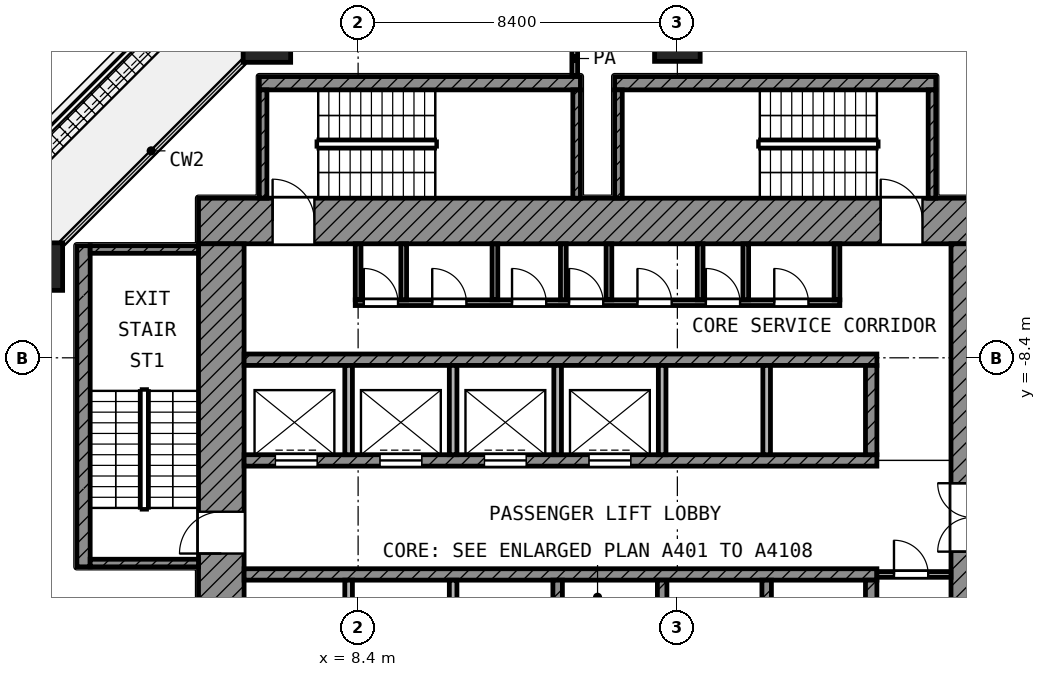
"""IFC4 building model, lengths in metres.
Left out: names, types, materials, properties, quantities, classifications, styles, units other than length and angle.
Written with IfcOpenShell. Run it as: python <this file> out.ifc"""

import sys

from ifc_helpers import new_model, si_unit, direction, frame, frame_2d, origin, origin_2d, place, context, subcontext, project, spatial, rectangle, extrude, element, fill, save


model = new_model("IFC4")
c1 = context("Model", 3, precision=1e-05, world=origin(), true_north=direction((0.0, 1.0)))
c2 = subcontext(c1, "Body", "Model", "MODEL_VIEW")
j1 = project(units=[si_unit("LENGTHUNIT", "METRE"), si_unit("PLANEANGLEUNIT", "RADIAN")], contexts=[c1])
p1 = place(None, origin())
s1 = spatial("IfcSite", under=j1, at=p1, CompositionType="ELEMENT")
p2 = place(p1, origin())
s2 = spatial("IfcBuilding", under=s1, at=p2, CompositionType="ELEMENT")
p3 = place(p2, frame((0.0, 0.0, 47.6)))
s3 = spatial("IfcBuildingStorey", under=s2, at=p3, CompositionType="ELEMENT", Elevation=47.6)
p4 = place(p3, frame((6.0, 0.0, 0.0), z_axis=(0.0, 0.0, 1.0), x_axis=(1.0, 0.0, 0.0)))
e1 = element("IfcColumn", 1, at=p4, inside=s3, PredefinedType="COLUMN", context=c2, shape_type="SweptSolid", body=[
    extrude(rectangle(XDim=1.25, YDim=1.25, at=origin_2d()), origin(), (0.0, 0.0, 1.0), 4.2),
])
p5 = place(p3, frame((16.8, 0.0, 0.0), z_axis=(0.0, 0.0, 1.0), x_axis=(1.0, 0.0, 0.0)))
e2 = element("IfcColumn", 2, at=p5, inside=s3, PredefinedType="COLUMN", context=c2, shape_type="SweptSolid", body=[
    extrude(rectangle(XDim=1.2, YDim=1.2, at=origin_2d()), origin(), (0.0, 0.0, 1.0), 4.2),
])
p6 = place(p3, frame((0.0, -6.0, 0.0), z_axis=(0.0, 0.0, 1.0), x_axis=(1.0, 0.0, 0.0)))
e3 = element("IfcColumn", 3, at=p6, inside=s3, PredefinedType="COLUMN", context=c2, shape_type="SweptSolid", body=[
    extrude(rectangle(XDim=1.25, YDim=1.25, at=origin_2d()), origin(), (0.0, 0.0, 1.0), 4.2),
])
p7 = place(p3, frame((4.2, -4.8, 0.0), z_axis=(0.0, 0.0, 1.0), x_axis=(1.0, 0.0, 0.0)))
e4 = element("IfcWall", 4, at=p7, inside=s3, PredefinedType="SHEAR", context=c2, shape_type="SweptSolid", body=[
    extrude(rectangle(XDim=20.9, YDim=1.2, at=frame_2d((10.45, 0.0))), origin(), (0.0, 0.0, 1.0), 3.78),
])
p8 = place(p7, frame((1.95, 0.0, 0.0)))
e5 = element("IfcOpeningElement", 5, at=p8, cuts=e4, PredefinedType="OPENING", context=c2, shape_type="SweptSolid", body=[
    extrude(rectangle(XDim=1.1, YDim=2.1, at=frame_2d((0.55, 1.05))), frame((0.0, 0.61, 0.0), z_axis=(0.0, -1.0, 0.0), x_axis=(1.0, 0.0, 0.0)), (0.0, 0.0, 1.0), 1.22),
])
p9 = place(p7, frame((17.95, 0.0, 0.0)))
e6 = element("IfcOpeningElement", 6, at=p9, cuts=e4, PredefinedType="OPENING", context=c2, shape_type="SweptSolid", body=[
    extrude(rectangle(XDim=1.1, YDim=2.1, at=frame_2d((0.55, 1.05))), frame((0.0, 0.61, 0.0), z_axis=(0.0, -1.0, 0.0), x_axis=(1.0, 0.0, 0.0)), (0.0, 0.0, 1.0), 1.22),
])
p10 = place(p3, frame((4.8, -25.1, 0.0), z_axis=(0.0, 0.0, 1.0), x_axis=(0.0, 1.0, 0.0)))
e7 = element("IfcWall", 7, at=p10, inside=s3, PredefinedType="SHEAR", context=c2, shape_type="SweptSolid", body=[
    extrude(rectangle(XDim=19.7, YDim=1.2, at=frame_2d((9.85, 0.0))), origin(), (0.0, 0.0, 1.0), 3.78),
])
p11 = place(p10, frame((11.55, 0.0, 0.0)))
e8 = element("IfcOpeningElement", 8, at=p11, cuts=e7, PredefinedType="OPENING", context=c2, shape_type="SweptSolid", body=[
    extrude(rectangle(XDim=1.1, YDim=2.1, at=frame_2d((0.55, 1.05))), frame((0.0, 0.61, 0.0), z_axis=(0.0, -1.0, 0.0), x_axis=(1.0, 0.0, 0.0)), (0.0, 0.0, 1.0), 1.22),
])
p12 = place(p10, frame((2.25, 0.0, 0.0)))
e9 = element("IfcOpeningElement", 9, at=p12, cuts=e7, PredefinedType="OPENING", context=c2, shape_type="SweptSolid", body=[
    extrude(rectangle(XDim=1.1, YDim=2.1, at=frame_2d((0.55, 1.05))), frame((0.0, 0.61, 0.0), z_axis=(0.0, -1.0, 0.0), x_axis=(1.0, 0.0, 0.0)), (0.0, 0.0, 1.0), 1.22),
])
p13 = place(p3, frame((24.55, -24.0, 0.0), z_axis=(0.0, 0.0, 1.0), x_axis=(0.0, 1.0, 0.0)))
e10 = element("IfcWall", 10, at=p13, inside=s3, PredefinedType="SHEAR", context=c2, shape_type="SweptSolid", body=[
    extrude(rectangle(XDim=18.6, YDim=1.1, at=frame_2d((9.3, 0.0))), origin(), (0.0, 0.0, 1.0), 3.78),
])
p14 = place(p13, frame((10.5, 0.0, 0.0)))
e11 = element("IfcOpeningElement", 11, at=p14, cuts=e10, PredefinedType="OPENING", context=c2, shape_type="SweptSolid", body=[
    extrude(rectangle(XDim=1.8, YDim=2.1, at=frame_2d((0.9, 1.05))), frame((0.0, 0.56, 0.0), z_axis=(0.0, -1.0, 0.0), x_axis=(1.0, 0.0, 0.0)), (0.0, 0.0, 1.0), 1.12),
])
p15 = place(p3, frame((5.4, -8.45, 0.0), z_axis=(0.0, 0.0, 1.0), x_axis=(1.0, 0.0, 0.0)))
e12 = element("IfcWall", 12, at=p15, inside=s3, PredefinedType="SHEAR", context=c2, shape_type="SweptSolid", body=[
    extrude(rectangle(XDim=16.65, YDim=0.3, at=frame_2d((8.325, 0.0))), origin(), (0.0, 0.0, 1.0), 3.78),
])
p16 = place(p3, frame((5.4, -11.1, 0.0), z_axis=(0.0, 0.0, 1.0), x_axis=(1.0, 0.0, 0.0)))
e13 = element("IfcWall", 13, at=p16, inside=s3, PredefinedType="SHEAR", context=c2, shape_type="SweptSolid", body=[
    extrude(rectangle(XDim=16.65, YDim=0.3, at=frame_2d((8.325, 0.0))), origin(), (0.0, 0.0, 1.0), 3.78),
])
p17 = place(p16, frame((0.825, 0.0, 0.0)))
e14 = element("IfcOpeningElement", 14, at=p17, cuts=e13, PredefinedType="OPENING", context=c2, shape_type="SweptSolid", body=[
    extrude(rectangle(XDim=1.1, YDim=2.1, at=frame_2d((0.55, 1.05))), frame((0.0, 0.16, 0.0), z_axis=(0.0, -1.0, 0.0), x_axis=(1.0, 0.0, 0.0)), (0.0, 0.0, 1.0), 0.32),
])
p18 = place(p16, frame((3.575, 0.0, 0.0)))
e15 = element("IfcOpeningElement", 15, at=p18, cuts=e13, PredefinedType="OPENING", context=c2, shape_type="SweptSolid", body=[
    extrude(rectangle(XDim=1.1, YDim=2.1, at=frame_2d((0.55, 1.05))), frame((0.0, 0.16, 0.0), z_axis=(0.0, -1.0, 0.0), x_axis=(1.0, 0.0, 0.0)), (0.0, 0.0, 1.0), 0.32),
])
p19 = place(p16, frame((6.325, 0.0, 0.0)))
e16 = element("IfcOpeningElement", 16, at=p19, cuts=e13, PredefinedType="OPENING", context=c2, shape_type="SweptSolid", body=[
    extrude(rectangle(XDim=1.1, YDim=2.1, at=frame_2d((0.55, 1.05))), frame((0.0, 0.16, 0.0), z_axis=(0.0, -1.0, 0.0), x_axis=(1.0, 0.0, 0.0)), (0.0, 0.0, 1.0), 0.32),
])
p20 = place(p16, frame((9.075, 0.0, 0.0)))
e17 = element("IfcOpeningElement", 17, at=p20, cuts=e13, PredefinedType="OPENING", context=c2, shape_type="SweptSolid", body=[
    extrude(rectangle(XDim=1.1, YDim=2.1, at=frame_2d((0.55, 1.05))), frame((0.0, 0.16, 0.0), z_axis=(0.0, -1.0, 0.0), x_axis=(1.0, 0.0, 0.0)), (0.0, 0.0, 1.0), 0.32),
])
p21 = place(p3, frame((5.4, -14.1, 0.0), z_axis=(0.0, 0.0, 1.0), x_axis=(1.0, 0.0, 0.0)))
e18 = element("IfcWall", 18, at=p21, inside=s3, PredefinedType="SHEAR", context=c2, shape_type="SweptSolid", body=[
    extrude(rectangle(XDim=16.65, YDim=0.3, at=frame_2d((8.325, 0.0))), origin(), (0.0, 0.0, 1.0), 3.78),
])
p22 = place(p3, frame((21.9, -10.95, 0.0), z_axis=(0.0, 0.0, 1.0), x_axis=(0.0, 1.0, 0.0)))
e19 = element("IfcWall", 19, at=p22, inside=s3, PredefinedType="SHEAR", context=c2, shape_type="SweptSolid", body=[
    extrude(rectangle(XDim=2.35, YDim=0.3, at=frame_2d((1.175, 0.0))), origin(), (0.0, 0.0, 1.0), 3.78),
])
p23 = place(p3, frame((21.9, -16.6, 0.0), z_axis=(0.0, 0.0, 1.0), x_axis=(0.0, 1.0, 0.0)))
e20 = element("IfcWall", 20, at=p23, inside=s3, PredefinedType="SHEAR", context=c2, shape_type="SweptSolid", body=[
    extrude(rectangle(XDim=2.35, YDim=0.3, at=frame_2d((1.175, 0.0))), origin(), (0.0, 0.0, 1.0), 3.78),
])
for number, where, z_axis, x_axis in (
    (21, (8.15, -10.95, 0.0), (0.0, 0.0, 1.0), (0.0, 1.0, 0.0)),
    (22, (10.9, -10.95, 0.0), (0.0, 0.0, 1.0), (0.0, 1.0, 0.0)),
    (23, (13.65, -10.95, 0.0), (0.0, 0.0, 1.0), (0.0, 1.0, 0.0)),
    (24, (16.4, -10.95, 0.0), (0.0, 0.0, 1.0), (0.0, 1.0, 0.0)),
    (25, (19.15, -10.95, 0.0), (0.0, 0.0, 1.0), (0.0, 1.0, 0.0)),
):
    element("IfcWall", number, at=place(p3, frame(where, z_axis=z_axis, x_axis=x_axis)), inside=s3, PredefinedType="PARTITIONING", context=c2, shape_type="SweptSolid", body=[
        extrude(rectangle(XDim=2.35, YDim=0.2, at=frame_2d((1.175, 0.0))), origin(), (0.0, 0.0, 1.0), 3.78),
    ])
for number, where, z_axis, x_axis in (
    (26, (8.15, -16.6, 0.0), (0.0, 0.0, 1.0), (0.0, 1.0, 0.0)),
    (27, (10.9, -16.6, 0.0), (0.0, 0.0, 1.0), (0.0, 1.0, 0.0)),
):
    element("IfcWall", number, at=place(p3, frame(where, z_axis=z_axis, x_axis=x_axis)), inside=s3, PredefinedType="PARTITIONING", context=c2, shape_type="SweptSolid", body=[
        extrude(rectangle(XDim=2.35, YDim=0.2, at=frame_2d((1.175, 0.0))), origin(), (0.0, 0.0, 1.0), 3.78),
    ])
for number, where, z_axis, x_axis in (
    (28, (13.65, -16.6, 0.0), (0.0, 0.0, 1.0), (0.0, 1.0, 0.0)),
    (29, (16.4, -16.6, 0.0), (0.0, 0.0, 1.0), (0.0, 1.0, 0.0)),
    (30, (19.15, -16.6, 0.0), (0.0, 0.0, 1.0), (0.0, 1.0, 0.0)),
):
    element("IfcWall", number, at=place(p3, frame(where, z_axis=z_axis, x_axis=x_axis)), inside=s3, PredefinedType="SHEAR", context=c2, shape_type="SweptSolid", body=[
        extrude(rectangle(XDim=2.35, YDim=0.25, at=frame_2d((1.175, 0.0))), origin(), (0.0, 0.0, 1.0), 3.78),
    ])
p24 = place(p3, frame((22.05, -14.1, 0.0), z_axis=(0.0, 0.0, 1.0), x_axis=(1.0, 0.0, 0.0)))
e31 = element("IfcWall", 31, at=p24, inside=s3, PredefinedType="PARTITIONING", context=c2, shape_type="SweptSolid", body=[
    extrude(rectangle(XDim=1.95, YDim=0.15, at=frame_2d((0.975, 0.0))), origin(), (0.0, 0.0, 1.0), 3.78),
])
p25 = place(p24, frame((0.45, 0.0, 0.0)))
e32 = element("IfcOpeningElement", 32, at=p25, cuts=e31, PredefinedType="OPENING", context=c2, shape_type="SweptSolid", body=[
    extrude(rectangle(XDim=0.9, YDim=2.1, at=frame_2d((0.45, 1.05))), frame((0.0, 0.085, 0.0), z_axis=(0.0, -1.0, 0.0), x_axis=(1.0, 0.0, 0.0)), (0.0, 0.0, 1.0), 0.17),
])
p26 = place(p3, frame((8.325, -6.95, 0.0), z_axis=(0.0, 0.0, 1.0), x_axis=(1.0, 0.0, 0.0)))
e33 = element("IfcWall", 33, at=p26, inside=s3, PredefinedType="PARTITIONING", context=c2, shape_type="SweptSolid", body=[
    extrude(rectangle(XDim=12.75, YDim=0.15, at=frame_2d((6.375, 0.0))), origin(), (0.0, 0.0, 1.0), 3.78),
])
p27 = place(p26, frame((0.225, 0.0, 0.0)))
e34 = element("IfcOpeningElement", 34, at=p27, cuts=e33, PredefinedType="OPENING", context=c2, shape_type="SweptSolid", body=[
    extrude(rectangle(XDim=0.9, YDim=2.1, at=frame_2d((0.45, 1.05))), frame((0.0, 0.085, 0.0), z_axis=(0.0, -1.0, 0.0), x_axis=(1.0, 0.0, 0.0)), (0.0, 0.0, 1.0), 0.17),
])
p28 = place(p26, frame((2.025, 0.0, 0.0)))
e35 = element("IfcOpeningElement", 35, at=p28, cuts=e33, PredefinedType="OPENING", context=c2, shape_type="SweptSolid", body=[
    extrude(rectangle(XDim=0.9, YDim=2.1, at=frame_2d((0.45, 1.05))), frame((0.0, 0.085, 0.0), z_axis=(0.0, -1.0, 0.0), x_axis=(1.0, 0.0, 0.0)), (0.0, 0.0, 1.0), 0.17),
])
p29 = place(p26, frame((4.125, 0.0, 0.0)))
e36 = element("IfcOpeningElement", 36, at=p29, cuts=e33, PredefinedType="OPENING", context=c2, shape_type="SweptSolid", body=[
    extrude(rectangle(XDim=0.9, YDim=2.1, at=frame_2d((0.45, 1.05))), frame((0.0, 0.085, 0.0), z_axis=(0.0, -1.0, 0.0), x_axis=(1.0, 0.0, 0.0)), (0.0, 0.0, 1.0), 0.17),
])
p30 = place(p26, frame((5.625, 0.0, 0.0)))
e37 = element("IfcOpeningElement", 37, at=p30, cuts=e33, PredefinedType="OPENING", context=c2, shape_type="SweptSolid", body=[
    extrude(rectangle(XDim=0.9, YDim=2.1, at=frame_2d((0.45, 1.05))), frame((0.0, 0.085, 0.0), z_axis=(0.0, -1.0, 0.0), x_axis=(1.0, 0.0, 0.0)), (0.0, 0.0, 1.0), 0.17),
])
p31 = place(p26, frame((7.425, 0.0, 0.0)))
e38 = element("IfcOpeningElement", 38, at=p31, cuts=e33, PredefinedType="OPENING", context=c2, shape_type="SweptSolid", body=[
    extrude(rectangle(XDim=0.9, YDim=2.1, at=frame_2d((0.45, 1.05))), frame((0.0, 0.085, 0.0), z_axis=(0.0, -1.0, 0.0), x_axis=(1.0, 0.0, 0.0)), (0.0, 0.0, 1.0), 0.17),
])
p32 = place(p26, frame((9.225, 0.0, 0.0)))
e39 = element("IfcOpeningElement", 39, at=p32, cuts=e33, PredefinedType="OPENING", context=c2, shape_type="SweptSolid", body=[
    extrude(rectangle(XDim=0.9, YDim=2.1, at=frame_2d((0.45, 1.05))), frame((0.0, 0.085, 0.0), z_axis=(0.0, -1.0, 0.0), x_axis=(1.0, 0.0, 0.0)), (0.0, 0.0, 1.0), 0.17),
])
p33 = place(p26, frame((11.025, 0.0, 0.0)))
e40 = element("IfcOpeningElement", 40, at=p33, cuts=e33, PredefinedType="OPENING", context=c2, shape_type="SweptSolid", body=[
    extrude(rectangle(XDim=0.9, YDim=2.1, at=frame_2d((0.45, 1.05))), frame((0.0, 0.085, 0.0), z_axis=(0.0, -1.0, 0.0), x_axis=(1.0, 0.0, 0.0)), (0.0, 0.0, 1.0), 0.17),
])
for number, where, z_axis, x_axis in (
    (41, (8.4, -6.875, 0.0), (0.0, 0.0, 1.0), (0.0, 1.0, 0.0)),
    (42, (9.6, -6.875, 0.0), (0.0, 0.0, 1.0), (0.0, 1.0, 0.0)),
    (43, (12.0, -6.875, 0.0), (0.0, 0.0, 1.0), (0.0, 1.0, 0.0)),
    (44, (13.8, -6.875, 0.0), (0.0, 0.0, 1.0), (0.0, 1.0, 0.0)),
    (45, (15.0, -6.875, 0.0), (0.0, 0.0, 1.0), (0.0, 1.0, 0.0)),
    (46, (17.4, -6.875, 0.0), (0.0, 0.0, 1.0), (0.0, 1.0, 0.0)),
    (47, (18.6, -6.875, 0.0), (0.0, 0.0, 1.0), (0.0, 1.0, 0.0)),
    (48, (21.0, -6.875, 0.0), (0.0, 0.0, 1.0), (0.0, 1.0, 0.0)),
):
    element("IfcWall", number, at=place(p3, frame(where, z_axis=z_axis, x_axis=x_axis)), inside=s3, PredefinedType="PARTITIONING", context=c2, shape_type="SweptSolid", body=[
        extrude(rectangle(XDim=1.475, YDim=0.15, at=frame_2d((0.738, 0.0))), origin(), (0.0, 0.0, 1.0), 3.78),
    ])
p34 = place(p3, frame((1.175, -13.9, 0.0), z_axis=(0.0, 0.0, 1.0), x_axis=(0.0, 1.0, 0.0)))
e49 = element("IfcWall", 49, at=p34, inside=s3, PredefinedType="SHEAR", context=c2, shape_type="SweptSolid", body=[
    extrude(rectangle(XDim=8.45, YDim=0.35, at=frame_2d((4.225, 0.0))), origin(), (0.0, 0.0, 1.0), 3.78),
])
for number, where, z_axis, x_axis in (
    (50, (1.35, -5.55, 0.0), (0.0, 0.0, 1.0), (1.0, 0.0, 0.0)),
    (51, (1.35, -13.8, 0.0), (0.0, 0.0, 1.0), (1.0, 0.0, 0.0)),
):
    element("IfcWall", number, at=place(p3, frame(where, z_axis=z_axis, x_axis=x_axis)), inside=s3, PredefinedType="SHEAR", context=c2, shape_type="SweptSolid", body=[
        extrude(rectangle(XDim=2.85, YDim=0.2, at=frame_2d((1.425, 0.0))), origin(), (0.0, 0.0, 1.0), 3.78),
    ])
p35 = place(p3, frame((5.8, -1.175, 0.0), z_axis=(0.0, 0.0, 1.0), x_axis=(1.0, 0.0, 0.0)))
e52 = element("IfcWall", 52, at=p35, inside=s3, PredefinedType="SHEAR", context=c2, shape_type="SweptSolid", body=[
    extrude(rectangle(XDim=8.45, YDim=0.35, at=frame_2d((4.225, 0.0))), origin(), (0.0, 0.0, 1.0), 3.78),
])
for number, where, z_axis, x_axis in (
    (53, (5.9, -4.2, 0.0), (0.0, 0.0, 1.0), (0.0, 1.0, 0.0)),
    (54, (14.15, -4.2, 0.0), (0.0, 0.0, 1.0), (0.0, 1.0, 0.0)),
):
    element("IfcWall", number, at=place(p3, frame(where, z_axis=z_axis, x_axis=x_axis)), inside=s3, PredefinedType="SHEAR", context=c2, shape_type="SweptSolid", body=[
        extrude(rectangle(XDim=2.85, YDim=0.2, at=frame_2d((1.425, 0.0))), origin(), (0.0, 0.0, 1.0), 3.78),
    ])
p36 = place(p3, frame((15.15, -1.175, 0.0), z_axis=(0.0, 0.0, 1.0), x_axis=(1.0, 0.0, 0.0)))
e55 = element("IfcWall", 55, at=p36, inside=s3, PredefinedType="SHEAR", context=c2, shape_type="SweptSolid", body=[
    extrude(rectangle(XDim=8.45, YDim=0.35, at=frame_2d((4.225, 0.0))), origin(), (0.0, 0.0, 1.0), 3.78),
])
for number, where, z_axis, x_axis in (
    (56, (15.25, -4.2, 0.0), (0.0, 0.0, 1.0), (0.0, 1.0, 0.0)),
    (57, (23.5, -4.2, 0.0), (0.0, 0.0, 1.0), (0.0, 1.0, 0.0)),
):
    element("IfcWall", number, at=place(p3, frame(where, z_axis=z_axis, x_axis=x_axis)), inside=s3, PredefinedType="SHEAR", context=c2, shape_type="SweptSolid", body=[
        extrude(rectangle(XDim=2.85, YDim=0.2, at=frame_2d((1.425, 0.0))), origin(), (0.0, 0.0, 1.0), 3.78),
    ])
p37 = place(p3, frame((14.1, -0.97, 0.0), z_axis=(0.0, 0.0, 1.0), x_axis=(0.0, 1.0, 0.0)))
e58 = element("IfcWall", 58, at=p37, inside=s3, PredefinedType="PARTITIONING", context=c2, shape_type="SweptSolid", body=[
    extrude(rectangle(XDim=0.89, YDim=0.15, at=frame_2d((0.445, 0.0))), origin(), (0.0, 0.0, 1.0), 3.78),
])
p38 = place(p17, origin())
e59 = element("IfcDoor", 59, at=p38, inside=s3, OperationType="DOUBLE_DOOR_SLIDING", PredefinedType="DOOR", context=c2, shape_type="SweptSolid", body=[
    extrude(rectangle(XDim=1.1, YDim=2.1, at=frame_2d((0.55, 1.05))), frame((0.0, 0.025, 0.0), z_axis=(0.0, -1.0, 0.0), x_axis=(1.0, 0.0, 0.0)), (0.0, 0.0, 1.0), 0.05),
])
fill(e14, e59)
p39 = place(p18, origin())
e60 = element("IfcDoor", 60, at=p39, inside=s3, OperationType="DOUBLE_DOOR_SLIDING", PredefinedType="DOOR", context=c2, shape_type="SweptSolid", body=[
    extrude(rectangle(XDim=1.1, YDim=2.1, at=frame_2d((0.55, 1.05))), frame((0.0, 0.025, 0.0), z_axis=(0.0, -1.0, 0.0), x_axis=(1.0, 0.0, 0.0)), (0.0, 0.0, 1.0), 0.05),
])
fill(e15, e60)
p40 = place(p19, origin())
e61 = element("IfcDoor", 61, at=p40, inside=s3, OperationType="DOUBLE_DOOR_SLIDING", PredefinedType="DOOR", context=c2, shape_type="SweptSolid", body=[
    extrude(rectangle(XDim=1.1, YDim=2.1, at=frame_2d((0.55, 1.05))), frame((0.0, 0.025, 0.0), z_axis=(0.0, -1.0, 0.0), x_axis=(1.0, 0.0, 0.0)), (0.0, 0.0, 1.0), 0.05),
])
fill(e16, e61)
p41 = place(p20, origin())
e62 = element("IfcDoor", 62, at=p41, inside=s3, OperationType="DOUBLE_DOOR_SLIDING", PredefinedType="DOOR", context=c2, shape_type="SweptSolid", body=[
    extrude(rectangle(XDim=1.1, YDim=2.1, at=frame_2d((0.55, 1.05))), frame((0.0, 0.025, 0.0), z_axis=(0.0, -1.0, 0.0), x_axis=(1.0, 0.0, 0.0)), (0.0, 0.0, 1.0), 0.05),
])
fill(e17, e62)
p42 = place(p11, origin())
e63 = element("IfcDoor", 63, at=p42, inside=s3, OperationType="SINGLE_SWING_LEFT", PredefinedType="DOOR", context=c2, shape_type="SweptSolid", body=[
    extrude(rectangle(XDim=1.1, YDim=2.1, at=frame_2d((0.55, 1.05))), frame((0.0, 0.025, 0.0), z_axis=(0.0, -1.0, 0.0), x_axis=(1.0, 0.0, 0.0)), (0.0, 0.0, 1.0), 0.05),
])
fill(e8, e63)
p43 = place(p8, origin())
e64 = element("IfcDoor", 64, at=p43, inside=s3, OperationType="SINGLE_SWING_LEFT", PredefinedType="DOOR", context=c2, shape_type="SweptSolid", body=[
    extrude(rectangle(XDim=1.1, YDim=2.1, at=frame_2d((0.55, 1.05))), frame((0.0, 0.025, 0.0), z_axis=(0.0, -1.0, 0.0), x_axis=(1.0, 0.0, 0.0)), (0.0, 0.0, 1.0), 0.05),
])
fill(e5, e64)
p44 = place(p9, origin())
e65 = element("IfcDoor", 65, at=p44, inside=s3, OperationType="SINGLE_SWING_LEFT", PredefinedType="DOOR", context=c2, shape_type="SweptSolid", body=[
    extrude(rectangle(XDim=1.1, YDim=2.1, at=frame_2d((0.55, 1.05))), frame((0.0, 0.025, 0.0), z_axis=(0.0, -1.0, 0.0), x_axis=(1.0, 0.0, 0.0)), (0.0, 0.0, 1.0), 0.05),
])
fill(e6, e65)
p45 = place(p27, origin())
e66 = element("IfcDoor", 66, at=p45, inside=s3, OperationType="SINGLE_SWING_LEFT", PredefinedType="DOOR", context=c2, shape_type="SweptSolid", body=[
    extrude(rectangle(XDim=0.9, YDim=2.1, at=frame_2d((0.45, 1.05))), frame((0.0, 0.025, 0.0), z_axis=(0.0, -1.0, 0.0), x_axis=(1.0, 0.0, 0.0)), (0.0, 0.0, 1.0), 0.05),
])
fill(e34, e66)
p46 = place(p28, origin())
e67 = element("IfcDoor", 67, at=p46, inside=s3, OperationType="SINGLE_SWING_LEFT", PredefinedType="DOOR", context=c2, shape_type="SweptSolid", body=[
    extrude(rectangle(XDim=0.9, YDim=2.1, at=frame_2d((0.45, 1.05))), frame((0.0, 0.025, 0.0), z_axis=(0.0, -1.0, 0.0), x_axis=(1.0, 0.0, 0.0)), (0.0, 0.0, 1.0), 0.05),
])
fill(e35, e67)
p47 = place(p29, origin())
e68 = element("IfcDoor", 68, at=p47, inside=s3, OperationType="SINGLE_SWING_LEFT", PredefinedType="DOOR", context=c2, shape_type="SweptSolid", body=[
    extrude(rectangle(XDim=0.9, YDim=2.1, at=frame_2d((0.45, 1.05))), frame((0.0, 0.025, 0.0), z_axis=(0.0, -1.0, 0.0), x_axis=(1.0, 0.0, 0.0)), (0.0, 0.0, 1.0), 0.05),
])
fill(e36, e68)
p48 = place(p30, origin())
e69 = element("IfcDoor", 69, at=p48, inside=s3, OperationType="SINGLE_SWING_LEFT", PredefinedType="DOOR", context=c2, shape_type="SweptSolid", body=[
    extrude(rectangle(XDim=0.9, YDim=2.1, at=frame_2d((0.45, 1.05))), frame((0.0, 0.025, 0.0), z_axis=(0.0, -1.0, 0.0), x_axis=(1.0, 0.0, 0.0)), (0.0, 0.0, 1.0), 0.05),
])
fill(e37, e69)
p49 = place(p31, origin())
e70 = element("IfcDoor", 70, at=p49, inside=s3, OperationType="SINGLE_SWING_LEFT", PredefinedType="DOOR", context=c2, shape_type="SweptSolid", body=[
    extrude(rectangle(XDim=0.9, YDim=2.1, at=frame_2d((0.45, 1.05))), frame((0.0, 0.025, 0.0), z_axis=(0.0, -1.0, 0.0), x_axis=(1.0, 0.0, 0.0)), (0.0, 0.0, 1.0), 0.05),
])
fill(e38, e70)
p50 = place(p32, origin())
e71 = element("IfcDoor", 71, at=p50, inside=s3, OperationType="SINGLE_SWING_LEFT", PredefinedType="DOOR", context=c2, shape_type="SweptSolid", body=[
    extrude(rectangle(XDim=0.9, YDim=2.1, at=frame_2d((0.45, 1.05))), frame((0.0, 0.025, 0.0), z_axis=(0.0, -1.0, 0.0), x_axis=(1.0, 0.0, 0.0)), (0.0, 0.0, 1.0), 0.05),
])
fill(e39, e71)
p51 = place(p33, origin())
e72 = element("IfcDoor", 72, at=p51, inside=s3, OperationType="SINGLE_SWING_LEFT", PredefinedType="DOOR", context=c2, shape_type="SweptSolid", body=[
    extrude(rectangle(XDim=0.9, YDim=2.1, at=frame_2d((0.45, 1.05))), frame((0.0, 0.025, 0.0), z_axis=(0.0, -1.0, 0.0), x_axis=(1.0, 0.0, 0.0)), (0.0, 0.0, 1.0), 0.05),
])
fill(e40, e72)
p52 = place(p25, origin())
e73 = element("IfcDoor", 73, at=p52, inside=s3, OperationType="SINGLE_SWING_LEFT", PredefinedType="DOOR", context=c2, shape_type="SweptSolid", body=[
    extrude(rectangle(XDim=0.9, YDim=2.1, at=frame_2d((0.45, 1.05))), frame((0.0, 0.025, 0.0), z_axis=(0.0, -1.0, 0.0), x_axis=(1.0, 0.0, 0.0)), (0.0, 0.0, 1.0), 0.05),
])
fill(e32, e73)
save(model, sys.argv[1])
